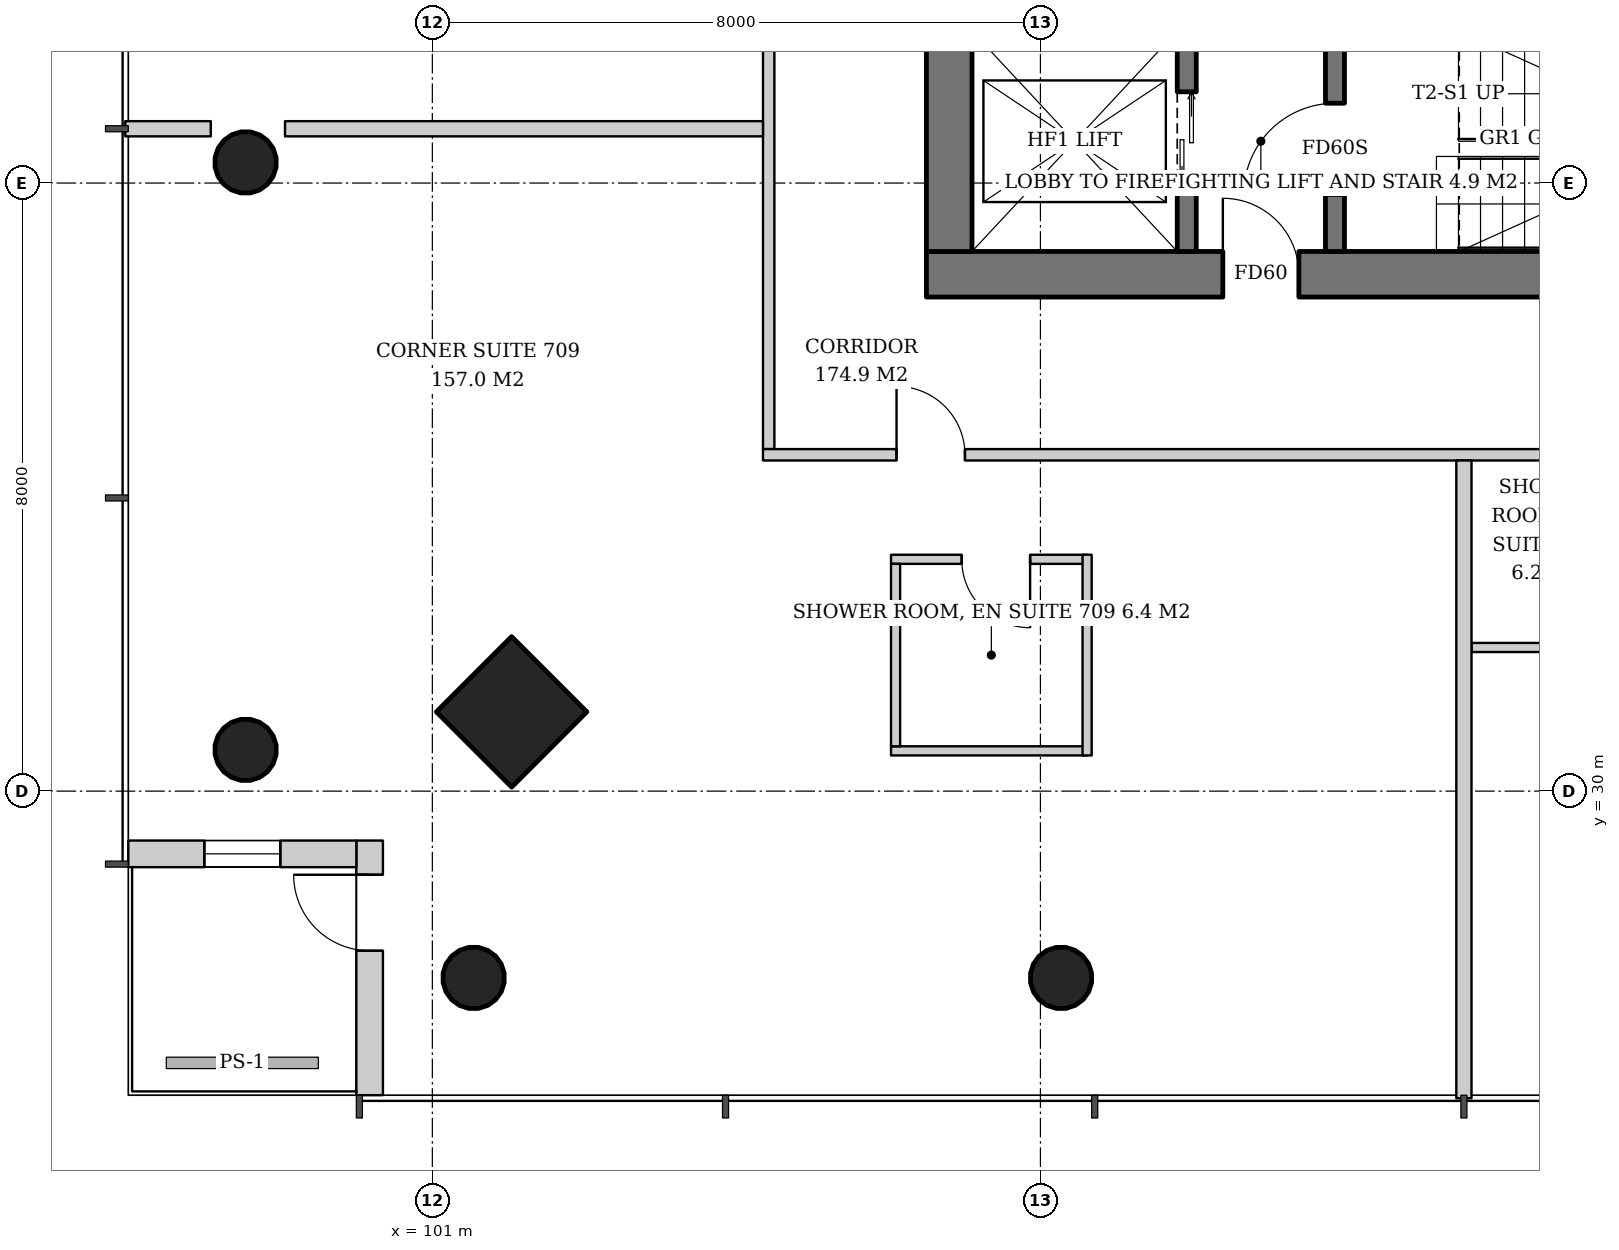
"""IFC4 building model, lengths in metres.
Left out: names, types, materials, properties, quantities, classifications, styles, units other than length and angle.
Written with IfcOpenShell. Run it as: python <this file> out.ifc"""

import sys

from ifc_helpers import new_model, si_unit, direction, frame, frame_2d, origin, origin_2d, place, context, subcontext, project, spatial, rectangle, hollow_circle, extrude, element, fill, save


model = new_model("IFC4")
c1 = context("Model", 3, precision=1e-05, world=origin(), true_north=direction((0.0, 1.0)))
c2 = subcontext(c1, "Body", "Model", "MODEL_VIEW")
j1 = project(units=[si_unit("LENGTHUNIT", "METRE"), si_unit("PLANEANGLEUNIT", "RADIAN")], contexts=[c1])
p1 = place(None, origin())
s1 = spatial("IfcSite", under=j1, at=p1, CompositionType="ELEMENT")
p2 = place(p1, origin())
s2 = spatial("IfcBuilding", under=s1, at=p2, CompositionType="ELEMENT")
p3 = place(p2, frame((0.0, 0.0, 32.4)))
s3 = spatial("IfcBuildingStorey", under=s2, at=p3, CompositionType="ELEMENT", Elevation=32.4)
p4 = place(p3, frame((101.991, 30.991, 0.0), z_axis=(0.043029647111, 0.043029647111, 0.998146732169), x_axis=(-0.707106781187, 0.707106781187, 0.0)))
e1 = element("IfcColumn", 1, at=p4, inside=s3, PredefinedType="COLUMN", context=c2, shape_type="SweptSolid", body=[
    extrude(rectangle(XDim=1.4, YDim=1.4, at=origin_2d()), origin(), (0.0, 0.0, 1.0), 3.807),
])
p5 = place(p3, frame((98.491, 30.491, 0.0), z_axis=(0.043029647111, 0.043029647111, 0.998146732169), x_axis=(-0.707106781187, 0.707106781187, 0.0)))
e2 = element("IfcColumn", 2, at=p5, inside=s3, PredefinedType="COLUMN", context=c2, shape_type="SweptSolid", body=[
    extrude(hollow_circle(Radius=0.406, WallThickness=0.03, at=origin_2d()), origin(), (0.0, 0.0, 1.0), 3.807),
])
p6 = place(p3, frame((98.491, 38.246, 0.0), z_axis=(0.043059525333, 0.021561848751, 0.998839808957), x_axis=(-0.44774654769, 0.894160516368, 0.0)))
e3 = element("IfcColumn", 3, at=p6, inside=s3, PredefinedType="COLUMN", context=c2, shape_type="SweptSolid", body=[
    extrude(hollow_circle(Radius=0.406, WallThickness=0.03, at=origin_2d()), origin(), (0.0, 0.0, 1.0), 3.804),
])
p7 = place(p3, frame((101.491, 27.491, 0.0), z_axis=(0.043029647111, 0.043029647111, 0.998146732169), x_axis=(-0.707106781187, 0.707106781187, 0.0)))
e4 = element("IfcColumn", 4, at=p7, inside=s3, PredefinedType="COLUMN", context=c2, shape_type="SweptSolid", body=[
    extrude(hollow_circle(Radius=0.406, WallThickness=0.03, at=origin_2d()), origin(), (0.0, 0.0, 1.0), 3.807),
])
p8 = place(p3, frame((109.246, 27.491, 0.0), z_axis=(0.021561848751, 0.043059525333, 0.998839808957), x_axis=(-0.894160516368, 0.44774654769, 0.0)))
e5 = element("IfcColumn", 5, at=p8, inside=s3, PredefinedType="COLUMN", context=c2, shape_type="SweptSolid", body=[
    extrude(hollow_circle(Radius=0.406, WallThickness=0.03, at=origin_2d()), origin(), (0.0, 0.0, 1.0), 3.804),
])
p9 = place(p3, frame((107.5, 36.8, 0.0), z_axis=(0.0, 0.0, 1.0), x_axis=(1.0, 0.0, 0.0)))
e6 = element("IfcWall", 6, at=p9, inside=s3, PredefinedType="SHEAR", context=c2, shape_type="SweptSolid", body=[
    extrude(rectangle(XDim=19.0, YDim=0.6, at=frame_2d((9.5, 0.0))), origin(), (0.0, 0.0, 1.0), 3.8),
])
p10 = place(p9, frame((3.9, 0.0, 0.0)))
e7 = element("IfcOpeningElement", 7, at=p10, cuts=e6, PredefinedType="OPENING", context=c2, shape_type="SweptSolid", body=[
    extrude(rectangle(XDim=1.0, YDim=2.1, at=frame_2d((0.5, 1.05))), frame((0.0, 0.31, 0.0), z_axis=(0.0, -1.0, 0.0), x_axis=(1.0, 0.0, 0.0)), (0.0, 0.0, 1.0), 0.62),
])
p11 = place(p9, frame((14.107, 0.0, 0.0)))
e8 = element("IfcOpeningElement", 8, at=p11, cuts=e6, PredefinedType="OPENING", context=c2, shape_type="SweptSolid", body=[
    extrude(rectangle(XDim=1.0, YDim=2.1, at=frame_2d((0.5, 1.05))), frame((0.0, 0.31, 0.0), z_axis=(0.0, -1.0, 0.0), x_axis=(1.0, 0.0, 0.0)), (0.0, 0.0, 1.0), 0.62),
])
p12 = place(p9, frame((15.638, 0.0, 0.0)))
e9 = element("IfcOpeningElement", 9, at=p12, cuts=e6, PredefinedType="OPENING", context=c2, shape_type="SweptSolid", body=[
    extrude(rectangle(XDim=1.0, YDim=2.1, at=frame_2d((0.5, 1.05))), frame((0.0, 0.31, 0.0), z_axis=(0.0, -1.0, 0.0), x_axis=(1.0, 0.0, 0.0)), (0.0, 0.0, 1.0), 0.62),
])
p13 = place(p9, frame((17.142, 0.0, 0.0)))
e10 = element("IfcOpeningElement", 10, at=p13, cuts=e6, PredefinedType="OPENING", context=c2, shape_type="SweptSolid", body=[
    extrude(rectangle(XDim=1.0, YDim=2.1, at=frame_2d((0.5, 1.05))), frame((0.0, 0.31, 0.0), z_axis=(0.0, -1.0, 0.0), x_axis=(1.0, 0.0, 0.0)), (0.0, 0.0, 1.0), 0.62),
])
p14 = place(p3, frame((107.8, 37.1, 0.0), z_axis=(0.0, 0.0, 1.0), x_axis=(0.0, 1.0, 0.0)))
e11 = element("IfcWall", 11, at=p14, inside=s3, PredefinedType="SHEAR", context=c2, shape_type="SweptSolid", body=[
    extrude(rectangle(XDim=17.8, YDim=0.6, at=frame_2d((8.9, 0.0))), origin(), (0.0, 0.0, 1.0), 3.8),
])
p15 = place(p14, frame((8.0, 0.0, 0.0)))
e12 = element("IfcOpeningElement", 12, at=p15, cuts=e11, PredefinedType="OPENING", context=c2, shape_type="SweptSolid", body=[
    extrude(rectangle(XDim=1.8, YDim=2.4, at=frame_2d((0.9, 1.2))), frame((0.0, 0.31, 0.0), z_axis=(0.0, -1.0, 0.0), x_axis=(1.0, 0.0, 0.0)), (0.0, 0.0, 1.0), 0.62),
])
p16 = place(p3, frame((100.175, 26.0, 0.0), z_axis=(0.0, 0.0, 1.0), x_axis=(0.0, 1.0, 0.0)))
e13 = element("IfcWall", 13, at=p16, inside=s3, PredefinedType="SOLIDWALL", context=c2, shape_type="SweptSolid", body=[
    extrude(rectangle(XDim=3.35, YDim=0.35, at=frame_2d((1.675, 0.0))), origin(), (0.0, 0.0, 1.0), 3.6),
])
p17 = place(p16, frame((1.9, 0.0, 0.0)))
e14 = element("IfcOpeningElement", 14, at=p17, cuts=e13, PredefinedType="OPENING", context=c2, shape_type="SweptSolid", body=[
    extrude(rectangle(XDim=1.0, YDim=2.4, at=frame_2d((0.5, 1.2))), frame((0.0, 0.185, 0.0), z_axis=(0.0, -1.0, 0.0), x_axis=(1.0, 0.0, 0.0)), (0.0, 0.0, 1.0), 0.37),
])
p18 = place(p3, frame((100.0, 29.175, 0.0), z_axis=(0.0, 0.0, 1.0), x_axis=(-1.0, 0.0, 0.0)))
e15 = element("IfcWall", 15, at=p18, inside=s3, PredefinedType="SOLIDWALL", context=c2, shape_type="SweptSolid", body=[
    extrude(rectangle(XDim=3.0, YDim=0.35, at=frame_2d((1.5, 0.0))), origin(), (0.0, 0.0, 1.0), 3.6),
])
p19 = place(p18, frame((1.0, 0.0, 0.9)))
e16 = element("IfcOpeningElement", 16, at=p19, cuts=e15, PredefinedType="OPENING", context=c2, shape_type="SweptSolid", body=[
    extrude(rectangle(XDim=1.0, YDim=2.4, at=frame_2d((0.5, 1.2))), frame((0.0, 0.185, 0.0), z_axis=(0.0, -1.0, 0.0), x_axis=(1.0, 0.0, 0.0)), (0.0, 0.0, 1.0), 0.37),
])
p20 = place(p3, frame((110.925, 37.1, 0.0), z_axis=(0.0, 0.0, 1.0), x_axis=(0.0, 1.0, 0.0)))
e17 = element("IfcWall", 17, at=p20, inside=s3, PredefinedType="SHEAR", context=c2, shape_type="SweptSolid", body=[
    extrude(rectangle(XDim=2.9, YDim=0.25, at=frame_2d((1.45, 0.0))), origin(), (0.0, 0.0, 1.0), 3.8),
])
p21 = place(p20, frame((0.8, 0.0, 0.0)))
e18 = element("IfcOpeningElement", 18, at=p21, cuts=e17, PredefinedType="OPENING", context=c2, shape_type="SweptSolid", body=[
    extrude(rectangle(XDim=1.3, YDim=2.2, at=frame_2d((0.65, 1.1))), frame((0.0, 0.135, 0.0), z_axis=(0.0, -1.0, 0.0), x_axis=(1.0, 0.0, 0.0)), (0.0, 0.0, 1.0), 0.27),
])
p22 = place(p3, frame((112.875, 37.1, 0.0), z_axis=(0.0, 0.0, 1.0), x_axis=(0.0, 1.0, 0.0)))
e19 = element("IfcWall", 19, at=p22, inside=s3, PredefinedType="SHEAR", context=c2, shape_type="SweptSolid", body=[
    extrude(rectangle(XDim=2.9, YDim=0.25, at=frame_2d((1.45, 0.0))), origin(), (0.0, 0.0, 1.0), 3.8),
])
p23 = place(p22, frame((0.75, 0.0, 0.0)))
e20 = element("IfcOpeningElement", 20, at=p23, cuts=e19, PredefinedType="OPENING", context=c2, shape_type="SweptSolid", body=[
    extrude(rectangle(XDim=1.2, YDim=2.1, at=frame_2d((0.6, 1.05))), frame((0.0, 0.135, 0.0), z_axis=(0.0, -1.0, 0.0), x_axis=(1.0, 0.0, 0.0)), (0.0, 0.0, 1.0), 0.27),
])
p24 = place(p3, frame((105.425, 57.65, 0.0), z_axis=(0.0, 0.0, 1.0), x_axis=(0.0, -1.0, 0.0)))
e21 = element("IfcWall", 21, at=p24, inside=s3, PredefinedType="PARTITIONING", context=c2, shape_type="SweptSolid", body=[
    extrude(rectangle(XDim=23.15, YDim=0.15, at=frame_2d((11.575, 0.0))), origin(), (0.0, 0.0, 1.0), 2.8),
])
p25 = place(p24, frame((1.757, 0.0, 0.0)))
e22 = element("IfcOpeningElement", 22, at=p25, cuts=e21, PredefinedType="OPENING", context=c2, shape_type="SweptSolid", body=[
    extrude(rectangle(XDim=0.9, YDim=2.1, at=frame_2d((0.45, 1.05))), frame((0.0, 0.085, 0.0), z_axis=(0.0, -1.0, 0.0), x_axis=(1.0, 0.0, 0.0)), (0.0, 0.0, 1.0), 0.17),
])
p26 = place(p24, frame((7.064, 0.0, 0.0)))
e23 = element("IfcOpeningElement", 23, at=p26, cuts=e21, PredefinedType="OPENING", context=c2, shape_type="SweptSolid", body=[
    extrude(rectangle(XDim=1.0, YDim=2.1, at=frame_2d((0.5, 1.05))), frame((0.0, 0.085, 0.0), z_axis=(0.0, -1.0, 0.0), x_axis=(1.0, 0.0, 0.0)), (0.0, 0.0, 1.0), 0.17),
])
p27 = place(p24, frame((11.971, 0.0, 0.0)))
e24 = element("IfcOpeningElement", 24, at=p27, cuts=e21, PredefinedType="OPENING", context=c2, shape_type="SweptSolid", body=[
    extrude(rectangle(XDim=0.9, YDim=2.1, at=frame_2d((0.45, 1.05))), frame((0.0, 0.085, 0.0), z_axis=(0.0, -1.0, 0.0), x_axis=(1.0, 0.0, 0.0)), (0.0, 0.0, 1.0), 0.17),
])
p28 = place(p3, frame((105.35, 38.714, 0.0), z_axis=(0.0, 0.0, 1.0), x_axis=(-1.0, 0.0, 0.0)))
e25 = element("IfcWall", 25, at=p28, inside=s3, PredefinedType="PARTITIONING", context=c2, shape_type="SweptSolid", body=[
    extrude(rectangle(XDim=6.288, YDim=0.2, at=frame_2d((3.144, 0.0))), origin(), (0.0, 0.0, 1.0), 3.6),
])
p29 = place(p3, frame((98.085, 38.714, 0.0), z_axis=(0.0, 0.0, 1.0), x_axis=(-1.0, 0.0, 0.0)))
e26 = element("IfcWall", 26, at=p29, inside=s3, PredefinedType="PARTITIONING", context=c2, shape_type="SweptSolid", body=[
    extrude(rectangle(XDim=1.125, YDim=0.2, at=frame_2d((0.562, 0.0))), origin(), (0.0, 0.0, 1.0), 3.6),
])
p30 = place(p3, frame((109.614, 33.05, 0.0), z_axis=(0.0, 0.0, 1.0), x_axis=(-1.0, 0.0, 0.0)))
e27 = element("IfcWall", 27, at=p30, inside=s3, PredefinedType="PARTITIONING", context=c2, shape_type="SweptSolid", body=[
    extrude(rectangle(XDim=2.58, YDim=0.12, at=frame_2d((1.29, 0.0))), origin(), (0.0, 0.0, 1.0), 2.8),
])
p31 = place(p30, frame((0.75, 0.0, 0.0)))
e28 = element("IfcOpeningElement", 28, at=p31, cuts=e27, PredefinedType="OPENING", context=c2, shape_type="SweptSolid", body=[
    extrude(rectangle(XDim=0.9, YDim=2.1, at=frame_2d((0.45, 1.05))), frame((0.0, 0.07, 0.0), z_axis=(0.0, -1.0, 0.0), x_axis=(1.0, 0.0, 0.0)), (0.0, 0.0, 1.0), 0.14),
])
p32 = place(p3, frame((109.614, 30.53, 0.0), z_axis=(0.0, 0.0, 1.0), x_axis=(-1.0, 0.0, 0.0)))
e29 = element("IfcWall", 29, at=p32, inside=s3, PredefinedType="PARTITIONING", context=c2, shape_type="SweptSolid", body=[
    extrude(rectangle(XDim=2.58, YDim=0.12, at=frame_2d((1.29, 0.0))), origin(), (0.0, 0.0, 1.0), 2.8),
])
p33 = place(p3, frame((107.094, 32.99, 0.0), z_axis=(0.0, 0.0, 1.0), x_axis=(0.0, -1.0, 0.0)))
e30 = element("IfcWall", 30, at=p33, inside=s3, PredefinedType="PARTITIONING", context=c2, shape_type="SweptSolid", body=[
    extrude(rectangle(XDim=2.4, YDim=0.12, at=frame_2d((1.2, 0.0))), origin(), (0.0, 0.0, 1.0), 2.847),
])
p34 = place(p3, frame((109.614, 33.11, 0.0), z_axis=(0.0, 0.0, 1.0), x_axis=(0.0, -1.0, 0.0)))
e31 = element("IfcWall", 31, at=p34, inside=s3, PredefinedType="PARTITIONING", context=c2, shape_type="SweptSolid", body=[
    extrude(rectangle(XDim=2.64, YDim=0.12, at=frame_2d((1.32, 0.0))), origin(), (0.0, 0.0, 1.0), 3.6),
])
p35 = place(p3, frame((114.671, 31.89, 0.0), z_axis=(0.0, 0.0, 1.0), x_axis=(1.0, 0.0, 0.0)))
e32 = element("IfcWall", 32, at=p35, inside=s3, PredefinedType="PARTITIONING", context=c2, shape_type="SweptSolid", body=[
    extrude(rectangle(XDim=2.42, YDim=0.12, at=frame_2d((1.21, 0.0))), origin(), (0.0, 0.0, 1.0), 2.847),
])
p36 = place(p3, frame((105.35, 34.425, 0.0), z_axis=(0.0, 0.0, 1.0), x_axis=(1.0, 0.0, 0.0)))
e33 = element("IfcWall", 33, at=p36, inside=s3, PredefinedType="PARTITIONING", context=c2, shape_type="SweptSolid", body=[
    extrude(rectangle(XDim=23.15, YDim=0.15, at=frame_2d((11.575, 0.0))), origin(), (0.0, 0.0, 1.0), 2.8),
])
p37 = place(p36, frame((1.757, 0.0, 0.0)))
e34 = element("IfcOpeningElement", 34, at=p37, cuts=e33, PredefinedType="OPENING", context=c2, shape_type="SweptSolid", body=[
    extrude(rectangle(XDim=0.9, YDim=2.1, at=frame_2d((0.45, 1.05))), frame((0.0, 0.085, 0.0), z_axis=(0.0, -1.0, 0.0), x_axis=(1.0, 0.0, 0.0)), (0.0, 0.0, 1.0), 0.17),
])
p38 = place(p36, frame((11.971, 0.0, 0.0)))
e35 = element("IfcOpeningElement", 35, at=p38, cuts=e33, PredefinedType="OPENING", context=c2, shape_type="SweptSolid", body=[
    extrude(rectangle(XDim=0.9, YDim=2.1, at=frame_2d((0.45, 1.05))), frame((0.0, 0.085, 0.0), z_axis=(0.0, -1.0, 0.0), x_axis=(1.0, 0.0, 0.0)), (0.0, 0.0, 1.0), 0.17),
])
p39 = place(p3, frame((114.572, 34.35, 0.0), z_axis=(0.0, 0.0, 1.0), x_axis=(0.0, -1.0, 0.0)))
e36 = element("IfcWall", 36, at=p39, inside=s3, PredefinedType="PARTITIONING", context=c2, shape_type="SweptSolid", body=[
    extrude(rectangle(XDim=8.39, YDim=0.2, at=frame_2d((4.195, 0.0))), origin(), (0.0, 0.0, 1.0), 3.05),
])
p40 = place(p17, origin())
e37 = element("IfcDoor", 37, at=p40, inside=s3, OperationType="SINGLE_SWING_RIGHT", PredefinedType="DOOR", context=c2, shape_type="SweptSolid", body=[
    extrude(rectangle(XDim=1.0, YDim=2.4, at=frame_2d((0.5, 1.2))), frame((0.0, 0.025, 0.0), z_axis=(0.0, -1.0, 0.0), x_axis=(1.0, 0.0, 0.0)), (0.0, 0.0, 1.0), 0.05),
])
fill(e14, e37)
p41 = place(p19, origin())
e38 = element("IfcWindow", 38, at=p41, inside=s3, PartitioningType="SINGLE_PANEL", PredefinedType="WINDOW", context=c2, shape_type="SweptSolid", body=[
    extrude(rectangle(XDim=1.0, YDim=2.4, at=frame_2d((0.5, 1.2))), frame((0.0, 0.03, 0.0), z_axis=(0.0, -1.0, 0.0), x_axis=(1.0, 0.0, 0.0)), (0.0, 0.0, 1.0), 0.06),
])
fill(e16, e38)
p42 = place(p21, origin())
e39 = element("IfcDoor", 39, at=p42, inside=s3, OperationType="DOUBLE_DOOR_SLIDING", PredefinedType="DOOR", context=c2, shape_type="SweptSolid", body=[
    extrude(rectangle(XDim=1.3, YDim=2.2, at=frame_2d((0.65, 1.1))), frame((0.0, 0.025, 0.0), z_axis=(0.0, -1.0, 0.0), x_axis=(1.0, 0.0, 0.0)), (0.0, 0.0, 1.0), 0.05),
])
fill(e18, e39)
p43 = place(p23, origin())
e40 = element("IfcDoor", 40, at=p43, inside=s3, OperationType="SINGLE_SWING_LEFT", PredefinedType="DOOR", context=c2, shape_type="SweptSolid", body=[
    extrude(rectangle(XDim=1.2, YDim=2.1, at=frame_2d((0.6, 1.05))), frame((0.0, 0.025, 0.0), z_axis=(0.0, -1.0, 0.0), x_axis=(1.0, 0.0, 0.0)), (0.0, 0.0, 1.0), 0.05),
])
fill(e20, e40)
p44 = place(p10, origin())
e41 = element("IfcDoor", 41, at=p44, inside=s3, OperationType="SINGLE_SWING_LEFT", PredefinedType="DOOR", context=c2, shape_type="SweptSolid", body=[
    extrude(rectangle(XDim=1.0, YDim=2.1, at=frame_2d((0.5, 1.05))), frame((0.0, 0.025, 0.0), z_axis=(0.0, -1.0, 0.0), x_axis=(1.0, 0.0, 0.0)), (0.0, 0.0, 1.0), 0.05),
])
fill(e7, e41)
p45 = place(p31, origin())
e42 = element("IfcDoor", 42, at=p45, inside=s3, OperationType="SINGLE_SWING_LEFT", PredefinedType="DOOR", context=c2, shape_type="SweptSolid", body=[
    extrude(rectangle(XDim=0.9, YDim=2.1, at=frame_2d((0.45, 1.05))), frame((0.0, 0.025, 0.0), z_axis=(0.0, -1.0, 0.0), x_axis=(1.0, 0.0, 0.0)), (0.0, 0.0, 1.0), 0.05),
])
fill(e28, e42)
p46 = place(p37, origin())
e43 = element("IfcDoor", 43, at=p46, inside=s3, OperationType="SINGLE_SWING_LEFT", PredefinedType="DOOR", context=c2, shape_type="SweptSolid", body=[
    extrude(rectangle(XDim=0.9, YDim=2.1, at=frame_2d((0.45, 1.05))), frame((0.0, 0.025, 0.0), z_axis=(0.0, -1.0, 0.0), x_axis=(1.0, 0.0, 0.0)), (0.0, 0.0, 1.0), 0.05),
])
fill(e34, e43)
save(model, sys.argv[1])
